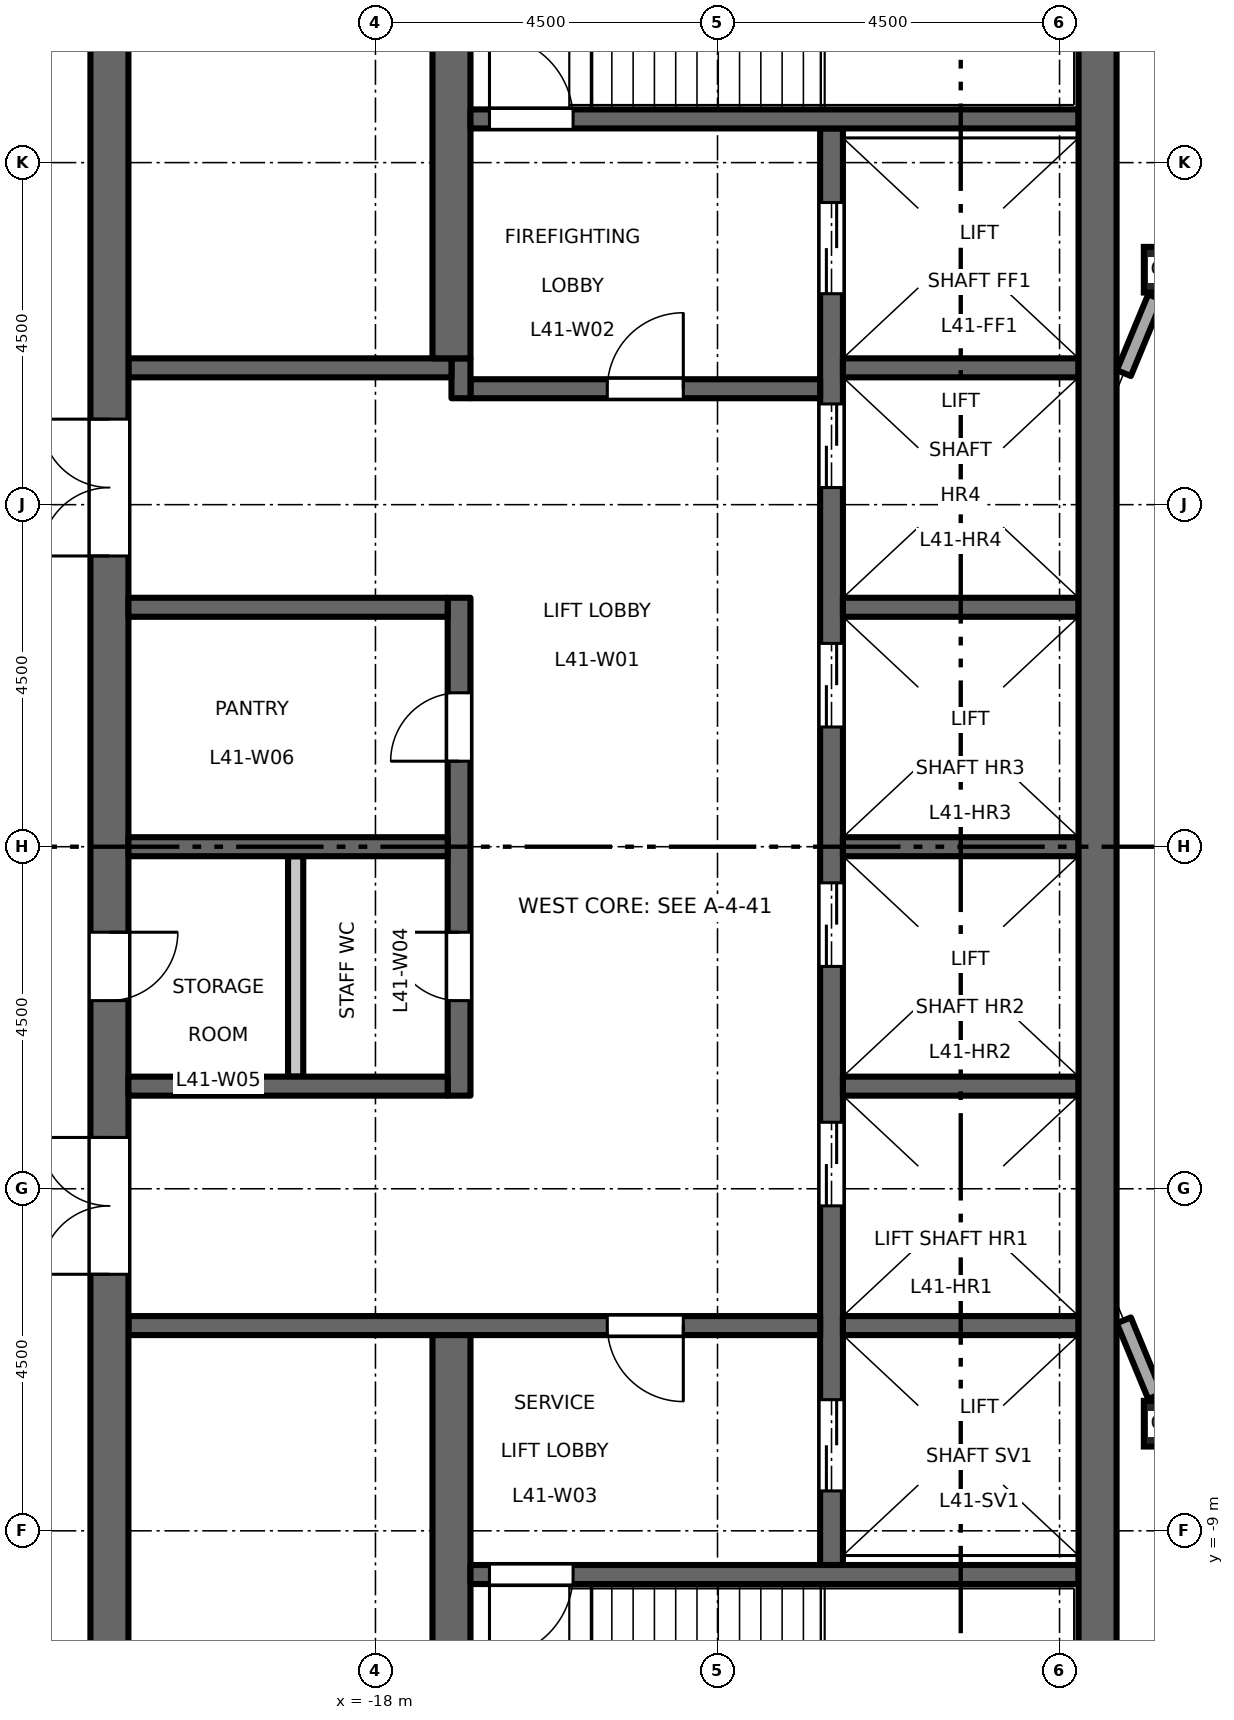
"""IFC4 building model, lengths in metres.
Left out: names, types, materials, properties, quantities, classifications, styles, units other than length and angle.
Written with IfcOpenShell. Run it as: python <this file> out.ifc"""

import sys

from ifc_helpers import new_model, si_unit, direction, frame, frame_2d, origin, origin_2d, place, context, subcontext, project, spatial, rectangle, hollow_rectangle, extrude, element, fill, save


model = new_model("IFC4")
c1 = context("Model", 3, precision=1e-05, world=origin(), true_north=direction((0.0, 1.0)))
c2 = subcontext(c1, "Body", "Model", "MODEL_VIEW")
j1 = project(units=[si_unit("LENGTHUNIT", "METRE"), si_unit("PLANEANGLEUNIT", "RADIAN")], contexts=[c1])
p1 = place(None, origin())
s1 = spatial("IfcSite", under=j1, at=p1, CompositionType="ELEMENT")
p2 = place(p1, origin())
s2 = spatial("IfcBuilding", under=s1, at=p2, CompositionType="ELEMENT")
p3 = place(p2, frame((0.0, 0.0, 192.7)))
s3 = spatial("IfcBuildingStorey", under=s2, at=p3, CompositionType="ELEMENT", Elevation=192.7)
for number, where, z_axis, x_axis in (
    (1, (-7.591, -7.591, 0.0), (0.0, 0.0, 1.0), (1.0, 0.0, 0.0)),
    (2, (-7.591, 7.591, 0.0), (0.0, 0.0, 1.0), (1.0, 0.0, 0.0)),
):
    element("IfcColumn", number, at=place(p3, frame(where, z_axis=z_axis, x_axis=x_axis)), inside=s3, PredefinedType="COLUMN", context=c2, shape_type="SweptSolid", body=[
        extrude(hollow_rectangle(XDim=0.6, YDim=0.6, WallThickness=0.032, at=origin_2d()), origin(), (0.0, 0.0, 1.0), 4.5),
    ])
p4 = place(p3, frame((-12.0, -9.45, 0.0), z_axis=(0.0, 0.0, 1.0), x_axis=(0.0, 1.0, 0.0)))
e3 = element("IfcWall", 3, at=p4, inside=s3, PredefinedType="SHEAR", context=c2, shape_type="SweptSolid", body=[
    extrude(rectangle(XDim=18.9, YDim=0.3, at=frame_2d((9.45, 0.0))), origin(), (0.0, 0.0, 1.0), 4.35),
])
p5 = place(p4, frame((4.725, 0.0, 0.0)))
e4 = element("IfcOpeningElement", 4, at=p5, cuts=e3, PredefinedType="OPENING", context=c2, shape_type="SweptSolid", body=[
    extrude(rectangle(XDim=1.1, YDim=2.1, at=frame_2d((0.55, 1.05))), frame((0.0, 0.16, 0.0), z_axis=(0.0, -1.0, 0.0), x_axis=(1.0, 0.0, 0.0)), (0.0, 0.0, 1.0), 0.32),
])
p6 = place(p4, frame((7.875, 0.0, 0.0)))
e5 = element("IfcOpeningElement", 5, at=p6, cuts=e3, PredefinedType="OPENING", context=c2, shape_type="SweptSolid", body=[
    extrude(rectangle(XDim=1.1, YDim=2.1, at=frame_2d((0.55, 1.05))), frame((0.0, 0.16, 0.0), z_axis=(0.0, -1.0, 0.0), x_axis=(1.0, 0.0, 0.0)), (0.0, 0.0, 1.0), 0.32),
])
p7 = place(p4, frame((11.025, 0.0, 0.0)))
e6 = element("IfcOpeningElement", 6, at=p7, cuts=e3, PredefinedType="OPENING", context=c2, shape_type="SweptSolid", body=[
    extrude(rectangle(XDim=1.1, YDim=2.1, at=frame_2d((0.55, 1.05))), frame((0.0, 0.16, 0.0), z_axis=(0.0, -1.0, 0.0), x_axis=(1.0, 0.0, 0.0)), (0.0, 0.0, 1.0), 0.32),
])
p8 = place(p4, frame((14.175, 0.0, 0.0)))
e7 = element("IfcOpeningElement", 7, at=p8, cuts=e3, PredefinedType="OPENING", context=c2, shape_type="SweptSolid", body=[
    extrude(rectangle(XDim=1.1, YDim=2.1, at=frame_2d((0.55, 1.05))), frame((0.0, 0.16, 0.0), z_axis=(0.0, -1.0, 0.0), x_axis=(1.0, 0.0, 0.0)), (0.0, 0.0, 1.0), 0.32),
])
p9 = place(p4, frame((16.725, 0.0, 0.0)))
e8 = element("IfcOpeningElement", 8, at=p9, cuts=e3, PredefinedType="OPENING", context=c2, shape_type="SweptSolid", body=[
    extrude(rectangle(XDim=1.2, YDim=2.1, at=frame_2d((0.6, 1.05))), frame((0.0, 0.16, 0.0), z_axis=(0.0, -1.0, 0.0), x_axis=(1.0, 0.0, 0.0)), (0.0, 0.0, 1.0), 0.32),
])
p10 = place(p4, frame((0.975, 0.0, 0.0)))
e9 = element("IfcOpeningElement", 9, at=p10, cuts=e3, PredefinedType="OPENING", context=c2, shape_type="SweptSolid", body=[
    extrude(rectangle(XDim=1.2, YDim=2.1, at=frame_2d((0.6, 1.05))), frame((0.0, 0.16, 0.0), z_axis=(0.0, -1.0, 0.0), x_axis=(1.0, 0.0, 0.0)), (0.0, 0.0, 1.0), 0.32),
])
p11 = place(p3, frame((-12.15, 6.025, 0.0), z_axis=(0.0, 0.0, 1.0), x_axis=(-1.0, 0.0, 0.0)))
e10 = element("IfcWall", 10, at=p11, inside=s3, PredefinedType="SHEAR", context=c2, shape_type="SweptSolid", body=[
    extrude(rectangle(XDim=4.6, YDim=0.25, at=frame_2d((2.3, 0.0))), origin(), (0.0, 0.0, 1.0), 4.35),
])
p12 = place(p11, frame((1.8, 0.0, 0.0)))
e11 = element("IfcOpeningElement", 11, at=p12, cuts=e10, PredefinedType="OPENING", context=c2, shape_type="SweptSolid", body=[
    extrude(rectangle(XDim=1.0, YDim=2.1, at=frame_2d((0.5, 1.05))), frame((0.0, 0.135, 0.0), z_axis=(0.0, -1.0, 0.0), x_axis=(1.0, 0.0, 0.0)), (0.0, 0.0, 1.0), 0.27),
])
p13 = place(p3, frame((-16.875, 5.9, 0.0), z_axis=(0.0, 0.0, 1.0), x_axis=(0.0, 1.0, 0.0)))
e12 = element("IfcWall", 12, at=p13, inside=s3, PredefinedType="SHEAR", context=c2, shape_type="SweptSolid", body=[
    extrude(rectangle(XDim=0.525, YDim=0.25, at=frame_2d((0.263, 0.0))), origin(), (0.0, 0.0, 1.0), 4.35),
])
p14 = place(p3, frame((-17.0, 6.3, 0.0), z_axis=(0.0, 0.0, 1.0), x_axis=(-1.0, 0.0, 0.0)))
e13 = element("IfcWall", 13, at=p14, inside=s3, PredefinedType="SHEAR", context=c2, shape_type="SweptSolid", body=[
    extrude(rectangle(XDim=4.25, YDim=0.25, at=frame_2d((2.125, 0.0))), origin(), (0.0, 0.0, 1.0), 4.35),
])
p15 = place(p3, frame((-12.15, -6.3, 0.0), z_axis=(0.0, 0.0, 1.0), x_axis=(-1.0, 0.0, 0.0)))
e14 = element("IfcWall", 14, at=p15, inside=s3, PredefinedType="SHEAR", context=c2, shape_type="SweptSolid", body=[
    extrude(rectangle(XDim=9.1, YDim=0.25, at=frame_2d((4.55, 0.0))), origin(), (0.0, 0.0, 1.0), 4.35),
])
p16 = place(p15, frame((1.8, 0.0, 0.0)))
e15 = element("IfcOpeningElement", 15, at=p16, cuts=e14, PredefinedType="OPENING", context=c2, shape_type="SweptSolid", body=[
    extrude(rectangle(XDim=1.0, YDim=2.1, at=frame_2d((0.5, 1.05))), frame((0.0, 0.135, 0.0), z_axis=(0.0, -1.0, 0.0), x_axis=(1.0, 0.0, 0.0)), (0.0, 0.0, 1.0), 0.27),
])
p17 = place(p3, frame((-21.5, -13.0, 0.0), z_axis=(0.0, 0.0, 1.0), x_axis=(0.0, 1.0, 0.0)))
e16 = element("IfcWall", 16, at=p17, inside=s3, PredefinedType="SHEAR", context=c2, shape_type="SweptSolid", body=[
    extrude(rectangle(XDim=26.0, YDim=0.5, at=frame_2d((13.0, 0.0))), origin(), (0.0, 0.0, 1.0), 4.35),
])
p18 = place(p17, frame((16.825, 0.0, 0.0)))
e17 = element("IfcOpeningElement", 17, at=p18, cuts=e16, PredefinedType="OPENING", context=c2, shape_type="SweptSolid", body=[
    extrude(rectangle(XDim=1.8, YDim=2.1, at=frame_2d((0.9, 1.05))), frame((0.0, 0.26, 0.0), z_axis=(0.0, -1.0, 0.0), x_axis=(1.0, 0.0, 0.0)), (0.0, 0.0, 1.0), 0.52),
])
p19 = place(p17, frame((7.375, 0.0, 0.0)))
e18 = element("IfcOpeningElement", 18, at=p19, cuts=e16, PredefinedType="OPENING", context=c2, shape_type="SweptSolid", body=[
    extrude(rectangle(XDim=1.8, YDim=2.1, at=frame_2d((0.9, 1.05))), frame((0.0, 0.26, 0.0), z_axis=(0.0, -1.0, 0.0), x_axis=(1.0, 0.0, 0.0)), (0.0, 0.0, 1.0), 0.52),
])
p20 = place(p17, frame((10.975, 0.0, 0.0)))
e19 = element("IfcOpeningElement", 19, at=p20, cuts=e16, PredefinedType="OPENING", context=c2, shape_type="SweptSolid", body=[
    extrude(rectangle(XDim=0.9, YDim=2.1, at=frame_2d((0.45, 1.05))), frame((0.0, 0.26, 0.0), z_axis=(0.0, -1.0, 0.0), x_axis=(1.0, 0.0, 0.0)), (0.0, 0.0, 1.0), 0.52),
])
p21 = place(p3, frame((-16.9, -3.275, 0.0), z_axis=(0.0, 0.0, 1.0), x_axis=(0.0, 1.0, 0.0)))
e20 = element("IfcWall", 20, at=p21, inside=s3, PredefinedType="SHEAR", context=c2, shape_type="SweptSolid", body=[
    extrude(rectangle(XDim=6.55, YDim=0.3, at=frame_2d((3.275, 0.0))), origin(), (0.0, 0.0, 1.0), 4.35),
])
p22 = place(p21, frame((1.25, 0.0, 0.0)))
e21 = element("IfcOpeningElement", 21, at=p22, cuts=e20, PredefinedType="OPENING", context=c2, shape_type="SweptSolid", body=[
    extrude(rectangle(XDim=0.9, YDim=2.1, at=frame_2d((0.45, 1.05))), frame((0.0, 0.16, 0.0), z_axis=(0.0, -1.0, 0.0), x_axis=(1.0, 0.0, 0.0)), (0.0, 0.0, 1.0), 0.32),
])
p23 = place(p21, frame((4.4, 0.0, 0.0)))
e22 = element("IfcOpeningElement", 22, at=p23, cuts=e20, PredefinedType="OPENING", context=c2, shape_type="SweptSolid", body=[
    extrude(rectangle(XDim=0.9, YDim=2.1, at=frame_2d((0.45, 1.05))), frame((0.0, 0.16, 0.0), z_axis=(0.0, -1.0, 0.0), x_axis=(1.0, 0.0, 0.0)), (0.0, 0.0, 1.0), 0.32),
])
for number, where, z_axis, x_axis in (
    (23, (-17.05, 0.0, 0.0), (0.0, 0.0, 1.0), (-1.0, 0.0, 0.0)),
    (24, (-17.05, 3.15, 0.0), (0.0, 0.0, 1.0), (-1.0, 0.0, 0.0)),
    (25, (-17.05, -3.15, 0.0), (0.0, 0.0, 1.0), (-1.0, 0.0, 0.0)),
):
    element("IfcWall", number, at=place(p3, frame(where, z_axis=z_axis, x_axis=x_axis)), inside=s3, PredefinedType="SHEAR", context=c2, shape_type="SweptSolid", body=[
        extrude(rectangle(XDim=4.2, YDim=0.25, at=frame_2d((2.1, 0.0))), origin(), (0.0, 0.0, 1.0), 4.35),
    ])
p24 = place(p3, frame((-19.05, -3.025, 0.0), z_axis=(0.0, 0.0, 1.0), x_axis=(0.0, 1.0, 0.0)))
e26 = element("IfcWall", 26, at=p24, inside=s3, PredefinedType="PARTITIONING", context=c2, shape_type="SweptSolid", body=[
    extrude(rectangle(XDim=2.9, YDim=0.2, at=frame_2d((1.45, 0.0))), origin(), (0.0, 0.0, 1.0), 4.35),
])
for number, where, z_axis, x_axis in (
    (27, (-17.0, 6.425, 0.0), (0.0, 0.0, 1.0), (0.0, 1.0, 0.0)),
    (28, (-17.0, -13.0, 0.0), (0.0, 0.0, 1.0), (0.0, 1.0, 0.0)),
):
    element("IfcWall", number, at=place(p3, frame(where, z_axis=z_axis, x_axis=x_axis)), inside=s3, PredefinedType="SHEAR", context=c2, shape_type="SweptSolid", body=[
        extrude(rectangle(XDim=6.575, YDim=0.5, at=frame_2d((3.288, 0.0))), origin(), (0.0, 0.0, 1.0), 4.35),
    ])
for number, where, z_axis, x_axis in (
    (29, (-8.75, 0.0, 0.0), (0.0, 0.0, 1.0), (-1.0, 0.0, 0.0)),
    (30, (-8.75, 3.15, 0.0), (0.0, 0.0, 1.0), (-1.0, 0.0, 0.0)),
    (31, (-8.75, 6.3, 0.0), (0.0, 0.0, 1.0), (-1.0, 0.0, 0.0)),
    (32, (-8.75, -3.15, 0.0), (0.0, 0.0, 1.0), (-1.0, 0.0, 0.0)),
    (33, (-8.75, -6.3, 0.0), (0.0, 0.0, 1.0), (-1.0, 0.0, 0.0)),
):
    element("IfcWall", number, at=place(p3, frame(where, z_axis=z_axis, x_axis=x_axis)), inside=s3, PredefinedType="SHEAR", context=c2, shape_type="SweptSolid", body=[
        extrude(rectangle(XDim=3.1, YDim=0.25, at=frame_2d((1.55, 0.0))), origin(), (0.0, 0.0, 1.0), 4.35),
    ])
p25 = place(p3, frame((-8.75, 9.575, 0.0), z_axis=(0.0, 0.0, 1.0), x_axis=(-1.0, 0.0, 0.0)))
e34 = element("IfcWall", 34, at=p25, inside=s3, PredefinedType="SHEAR", context=c2, shape_type="SweptSolid", body=[
    extrude(rectangle(XDim=8.0, YDim=0.25, at=frame_2d((4.0, 0.0))), origin(), (0.0, 0.0, 1.0), 4.35),
])
p26 = place(p25, frame((6.65, 0.0, 0.0)))
e35 = element("IfcOpeningElement", 35, at=p26, cuts=e34, PredefinedType="OPENING", context=c2, shape_type="SweptSolid", body=[
    extrude(rectangle(XDim=1.1, YDim=2.1, at=frame_2d((0.55, 1.05))), frame((0.0, 0.135, 0.0), z_axis=(0.0, -1.0, 0.0), x_axis=(1.0, 0.0, 0.0)), (0.0, 0.0, 1.0), 0.27),
])
p27 = place(p3, frame((-8.75, -9.575, 0.0), z_axis=(0.0, 0.0, 1.0), x_axis=(-1.0, 0.0, 0.0)))
e36 = element("IfcWall", 36, at=p27, inside=s3, PredefinedType="SHEAR", context=c2, shape_type="SweptSolid", body=[
    extrude(rectangle(XDim=8.0, YDim=0.25, at=frame_2d((4.0, 0.0))), origin(), (0.0, 0.0, 1.0), 4.35),
])
p28 = place(p27, frame((6.65, 0.0, 0.0)))
e37 = element("IfcOpeningElement", 37, at=p28, cuts=e36, PredefinedType="OPENING", context=c2, shape_type="SweptSolid", body=[
    extrude(rectangle(XDim=1.1, YDim=2.1, at=frame_2d((0.55, 1.05))), frame((0.0, 0.135, 0.0), z_axis=(0.0, -1.0, 0.0), x_axis=(1.0, 0.0, 0.0)), (0.0, 0.0, 1.0), 0.27),
])
p29 = place(p3, frame((-8.5, -13.0, 0.0), z_axis=(0.0, 0.0, 1.0), x_axis=(0.0, 1.0, 0.0)))
e38 = element("IfcWall", 38, at=p29, inside=s3, PredefinedType="SHEAR", context=c2, shape_type="SweptSolid", body=[
    extrude(rectangle(XDim=26.0, YDim=0.5, at=frame_2d((13.0, 0.0))), origin(), (0.0, 0.0, 1.0), 4.35),
])
for number, where, z_axis, x_axis in (
    (39, (-7.741, 7.229, 0.0), (0.0, 0.0, 1.0), (-0.383, -0.924, 0.0)),
    (40, (-8.154, -6.231, 0.0), (0.0, 0.0, 1.0), (0.383, -0.924, 0.0)),
):
    element("IfcWall", number, at=place(p3, frame(where, z_axis=z_axis, x_axis=x_axis)), inside=s3, PredefinedType="STANDARD", context=c2, shape_type="SweptSolid", body=[
        extrude(rectangle(XDim=1.08, YDim=0.2, at=frame_2d((0.54, 0.0))), origin(), (0.0, 0.0, 1.0), 3.918),
    ])
p30 = place(p12, origin())
e41 = element("IfcDoor", 41, at=p30, inside=s3, OperationType="SINGLE_SWING_LEFT", PredefinedType="DOOR", context=c2, shape_type="SweptSolid", body=[
    extrude(rectangle(XDim=1.0, YDim=2.1, at=frame_2d((0.5, 1.05))), frame((0.0, 0.025, 0.0), z_axis=(0.0, -1.0, 0.0), x_axis=(1.0, 0.0, 0.0)), (0.0, 0.0, 1.0), 0.05),
])
fill(e11, e41)
p31 = place(p16, origin())
e42 = element("IfcDoor", 42, at=p31, inside=s3, OperationType="SINGLE_SWING_RIGHT", PredefinedType="DOOR", context=c2, shape_type="SweptSolid", body=[
    extrude(rectangle(XDim=1.0, YDim=2.1, at=frame_2d((0.5, 1.05))), frame((0.0, 0.025, 0.0), z_axis=(0.0, -1.0, 0.0), x_axis=(1.0, 0.0, 0.0)), (0.0, 0.0, 1.0), 0.05),
])
fill(e15, e42)
p32 = place(p26, origin())
e43 = element("IfcDoor", 43, at=p32, inside=s3, OperationType="SINGLE_SWING_RIGHT", PredefinedType="DOOR", context=c2, shape_type="SweptSolid", body=[
    extrude(rectangle(XDim=1.1, YDim=2.1, at=frame_2d((0.55, 1.05))), frame((0.0, 0.025, 0.0), z_axis=(0.0, -1.0, 0.0), x_axis=(1.0, 0.0, 0.0)), (0.0, 0.0, 1.0), 0.05),
])
fill(e35, e43)
p33 = place(p28, origin())
e44 = element("IfcDoor", 44, at=p33, inside=s3, OperationType="SINGLE_SWING_LEFT", PredefinedType="DOOR", context=c2, shape_type="SweptSolid", body=[
    extrude(rectangle(XDim=1.1, YDim=2.1, at=frame_2d((0.55, 1.05))), frame((0.0, 0.025, 0.0), z_axis=(0.0, -1.0, 0.0), x_axis=(1.0, 0.0, 0.0)), (0.0, 0.0, 1.0), 0.05),
])
fill(e37, e44)
p34 = place(p18, origin())
e45 = element("IfcDoor", 45, at=p34, inside=s3, OperationType="DOUBLE_DOOR_DOUBLE_SWING", PredefinedType="DOOR", context=c2, shape_type="SweptSolid", body=[
    extrude(rectangle(XDim=1.8, YDim=2.1, at=frame_2d((0.9, 1.05))), frame((0.0, 0.025, 0.0), z_axis=(0.0, -1.0, 0.0), x_axis=(1.0, 0.0, 0.0)), (0.0, 0.0, 1.0), 0.05),
])
fill(e17, e45)
p35 = place(p19, origin())
e46 = element("IfcDoor", 46, at=p35, inside=s3, OperationType="DOUBLE_DOOR_DOUBLE_SWING", PredefinedType="DOOR", context=c2, shape_type="SweptSolid", body=[
    extrude(rectangle(XDim=1.8, YDim=2.1, at=frame_2d((0.9, 1.05))), frame((0.0, 0.025, 0.0), z_axis=(0.0, -1.0, 0.0), x_axis=(1.0, 0.0, 0.0)), (0.0, 0.0, 1.0), 0.05),
])
fill(e18, e46)
p36 = place(p5, origin())
e47 = element("IfcDoor", 47, at=p36, inside=s3, OperationType="DOUBLE_DOOR_SLIDING", PredefinedType="DOOR", context=c2, shape_type="SweptSolid", body=[
    extrude(rectangle(XDim=1.1, YDim=2.1, at=frame_2d((0.55, 1.05))), frame((0.0, 0.025, 0.0), z_axis=(0.0, -1.0, 0.0), x_axis=(1.0, 0.0, 0.0)), (0.0, 0.0, 1.0), 0.05),
])
fill(e4, e47)
p37 = place(p6, origin())
e48 = element("IfcDoor", 48, at=p37, inside=s3, OperationType="DOUBLE_DOOR_SLIDING", PredefinedType="DOOR", context=c2, shape_type="SweptSolid", body=[
    extrude(rectangle(XDim=1.1, YDim=2.1, at=frame_2d((0.55, 1.05))), frame((0.0, 0.025, 0.0), z_axis=(0.0, -1.0, 0.0), x_axis=(1.0, 0.0, 0.0)), (0.0, 0.0, 1.0), 0.05),
])
fill(e5, e48)
p38 = place(p7, origin())
e49 = element("IfcDoor", 49, at=p38, inside=s3, OperationType="DOUBLE_DOOR_SLIDING", PredefinedType="DOOR", context=c2, shape_type="SweptSolid", body=[
    extrude(rectangle(XDim=1.1, YDim=2.1, at=frame_2d((0.55, 1.05))), frame((0.0, 0.025, 0.0), z_axis=(0.0, -1.0, 0.0), x_axis=(1.0, 0.0, 0.0)), (0.0, 0.0, 1.0), 0.05),
])
fill(e6, e49)
p39 = place(p8, origin())
e50 = element("IfcDoor", 50, at=p39, inside=s3, OperationType="DOUBLE_DOOR_SLIDING", PredefinedType="DOOR", context=c2, shape_type="SweptSolid", body=[
    extrude(rectangle(XDim=1.1, YDim=2.1, at=frame_2d((0.55, 1.05))), frame((0.0, 0.025, 0.0), z_axis=(0.0, -1.0, 0.0), x_axis=(1.0, 0.0, 0.0)), (0.0, 0.0, 1.0), 0.05),
])
fill(e7, e50)
p40 = place(p9, origin())
e51 = element("IfcDoor", 51, at=p40, inside=s3, OperationType="DOUBLE_DOOR_SLIDING", PredefinedType="DOOR", context=c2, shape_type="SweptSolid", body=[
    extrude(rectangle(XDim=1.2, YDim=2.1, at=frame_2d((0.6, 1.05))), frame((0.0, 0.025, 0.0), z_axis=(0.0, -1.0, 0.0), x_axis=(1.0, 0.0, 0.0)), (0.0, 0.0, 1.0), 0.05),
])
fill(e8, e51)
p41 = place(p10, origin())
e52 = element("IfcDoor", 52, at=p41, inside=s3, OperationType="DOUBLE_DOOR_SLIDING", PredefinedType="DOOR", context=c2, shape_type="SweptSolid", body=[
    extrude(rectangle(XDim=1.2, YDim=2.1, at=frame_2d((0.6, 1.05))), frame((0.0, 0.025, 0.0), z_axis=(0.0, -1.0, 0.0), x_axis=(1.0, 0.0, 0.0)), (0.0, 0.0, 1.0), 0.05),
])
fill(e9, e52)
p42 = place(p22, origin())
e53 = element("IfcDoor", 53, at=p42, inside=s3, OperationType="SINGLE_SWING_LEFT", PredefinedType="DOOR", context=c2, shape_type="SweptSolid", body=[
    extrude(rectangle(XDim=0.9, YDim=2.1, at=frame_2d((0.45, 1.05))), frame((0.0, 0.025, 0.0), z_axis=(0.0, -1.0, 0.0), x_axis=(1.0, 0.0, 0.0)), (0.0, 0.0, 1.0), 0.05),
])
fill(e21, e53)
p43 = place(p20, origin())
e54 = element("IfcDoor", 54, at=p43, inside=s3, OperationType="SINGLE_SWING_RIGHT", PredefinedType="DOOR", context=c2, shape_type="SweptSolid", body=[
    extrude(rectangle(XDim=0.9, YDim=2.1, at=frame_2d((0.45, 1.05))), frame((0.0, 0.025, 0.0), z_axis=(0.0, -1.0, 0.0), x_axis=(1.0, 0.0, 0.0)), (0.0, 0.0, 1.0), 0.05),
])
fill(e19, e54)
p44 = place(p23, origin())
e55 = element("IfcDoor", 55, at=p44, inside=s3, OperationType="SINGLE_SWING_RIGHT", PredefinedType="DOOR", context=c2, shape_type="SweptSolid", body=[
    extrude(rectangle(XDim=0.9, YDim=2.1, at=frame_2d((0.45, 1.05))), frame((0.0, 0.025, 0.0), z_axis=(0.0, -1.0, 0.0), x_axis=(1.0, 0.0, 0.0)), (0.0, 0.0, 1.0), 0.05),
])
fill(e22, e55)
save(model, sys.argv[1])
